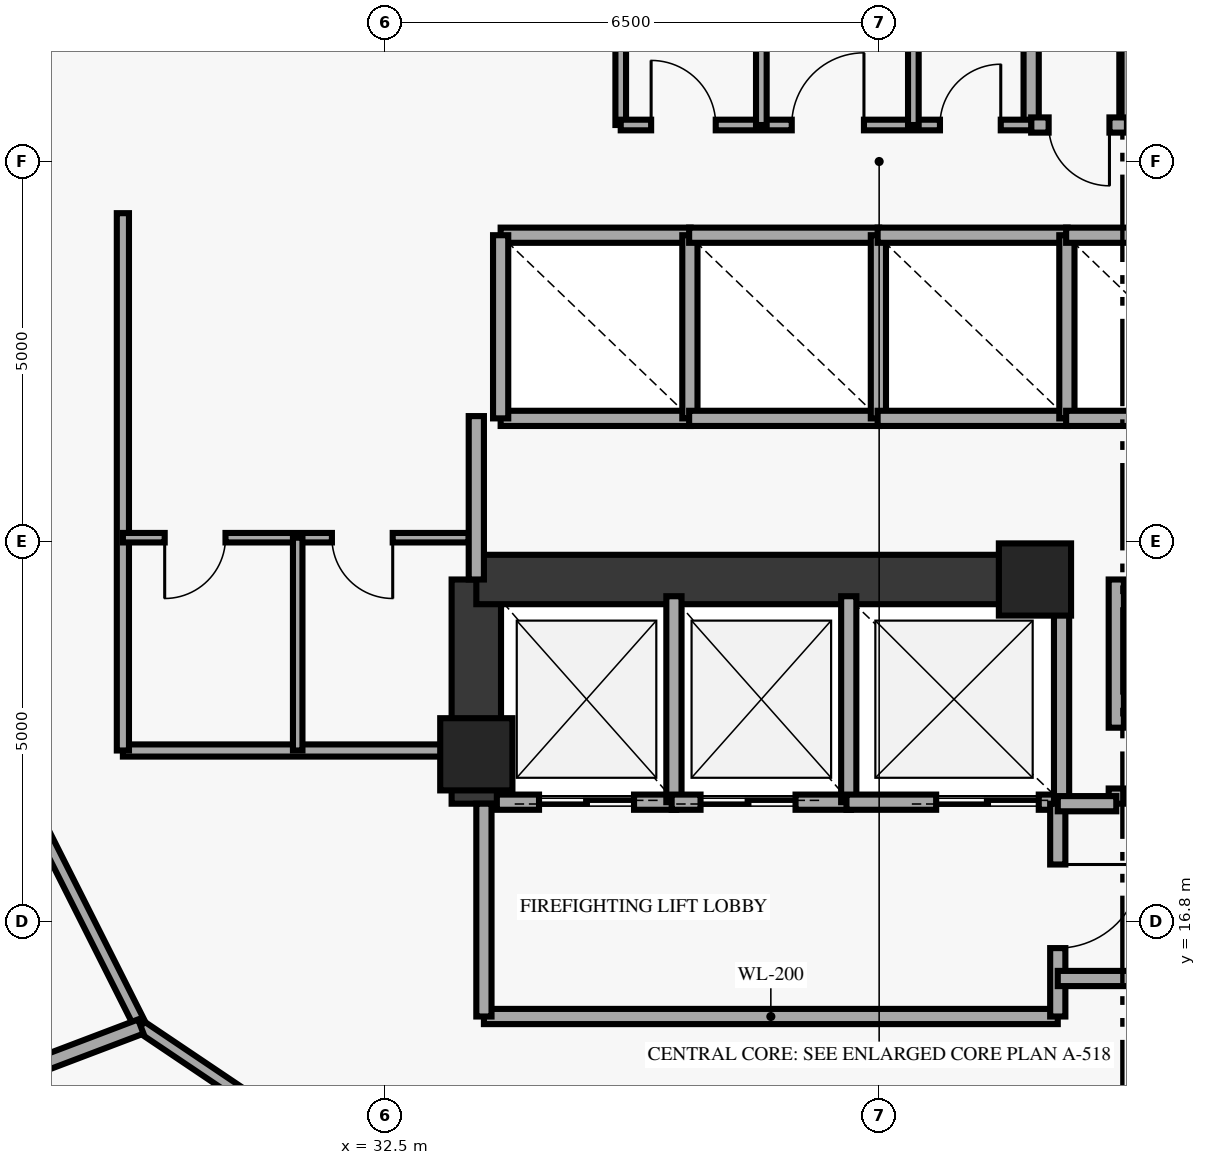
"""IFC4 building model, lengths in metres.
Left out: names, types, materials, properties, quantities, classifications, styles, units other than length and angle.
Written with IfcOpenShell. Run it as: python <this file> out.ifc"""

import sys

from ifc_helpers import new_model, si_unit, direction, frame, frame_2d, origin, origin_2d, place, context, subcontext, project, spatial, rectangle, extrude, element, fill, save


model = new_model("IFC4")
c1 = context("Model", 3, precision=1e-05, world=origin(), true_north=direction((0.0, 1.0)))
c2 = subcontext(c1, "Body", "Model", "MODEL_VIEW")
j1 = project(units=[si_unit("LENGTHUNIT", "METRE"), si_unit("PLANEANGLEUNIT", "RADIAN")], contexts=[c1])
p1 = place(None, origin())
s1 = spatial("IfcSite", under=j1, at=p1, CompositionType="ELEMENT")
p2 = place(p1, origin())
s2 = spatial("IfcBuilding", under=s1, at=p2, CompositionType="ELEMENT")
p3 = place(p2, frame((0.0, 0.0, 195.95)))
s3 = spatial("IfcBuildingStorey", under=s2, at=p3, CompositionType="ELEMENT", Elevation=195.95)
for number, where, z_axis, x_axis in (
    (1, (33.7, 19.0, 0.0), (0.0, 0.0, 1.0), (1.0, 0.0, 0.0)),
    (2, (41.05, 21.3, 0.0), (0.0, 0.0, 1.0), (1.0, 0.0, 0.0)),
):
    element("IfcColumn", number, at=place(p3, frame(where, z_axis=z_axis, x_axis=x_axis)), inside=s3, PredefinedType="PILASTER", context=c2, shape_type="SweptSolid", body=[
        extrude(rectangle(XDim=0.95, YDim=0.95, at=origin_2d()), origin(), (0.0, 0.0, 1.0), 6.88),
    ])
p4 = place(p3, frame((33.7, 18.35, 0.0), z_axis=(0.0, 0.0, 1.0), x_axis=(0.0, 1.0, 0.0)))
e3 = element("IfcWall", 3, at=p4, inside=s3, PredefinedType="SHEAR", context=c2, shape_type="SweptSolid", body=[
    extrude(rectangle(XDim=2.95, YDim=0.65, at=frame_2d((1.475, 0.0))), origin(), (0.0, 0.0, 1.0), 6.88),
])
p5 = place(p3, frame((33.7, 21.3, 0.0), z_axis=(0.0, 0.0, 1.0), x_axis=(1.0, 0.0, 0.0)))
e4 = element("IfcWall", 4, at=p5, inside=s3, PredefinedType="SHEAR", context=c2, shape_type="SweptSolid", body=[
    extrude(rectangle(XDim=7.55, YDim=0.65, at=frame_2d((3.775, 0.0))), origin(), (0.0, 0.0, 1.0), 6.88),
])
p6 = place(p3, frame((35.6, 27.28, 0.0), z_axis=(0.0, 0.0, 1.0), x_axis=(0.0, 1.0, 0.0)))
e5 = element("IfcWall", 5, at=p6, inside=s3, PredefinedType="PARTITIONING", context=c2, shape_type="SweptSolid", body=[
    extrude(rectangle(XDim=1.77, YDim=0.14, at=frame_2d((0.885, 0.0))), origin(), (0.0, 0.0, 1.0), 6.88),
])
for number, where, z_axis, x_axis in (
    (6, (41.0, 27.28, 0.0), (0.0, 0.0, 1.0), (0.0, 1.0, 0.0)),
    (7, (42.26, 27.28, 0.0), (0.0, 0.0, 1.0), (0.0, 1.0, 0.0)),
):
    element("IfcWall", number, at=place(p3, frame(where, z_axis=z_axis, x_axis=x_axis)), inside=s3, PredefinedType="SOLIDWALL", context=c2, shape_type="SweptSolid", body=[
        extrude(rectangle(XDim=1.77, YDim=0.2, at=frame_2d((0.885, 0.0))), origin(), (0.0, 0.0, 1.0), 6.88),
    ])
p7 = place(p3, frame((41.0, 27.28, 0.0), z_axis=(0.0, 0.0, 1.0), x_axis=(1.0, 0.0, 0.0)))
e8 = element("IfcWall", 8, at=p7, inside=s3, PredefinedType="SOLIDWALL", context=c2, shape_type="SweptSolid", body=[
    extrude(rectangle(XDim=1.26, YDim=0.2, at=frame_2d((0.63, 0.0))), origin(), (0.0, 0.0, 1.0), 6.88),
])
p8 = place(p7, frame((0.23, 0.0, 0.0)))
e9 = element("IfcOpeningElement", 9, at=p8, cuts=e8, PredefinedType="OPENING", context=c2, shape_type="SweptSolid", body=[
    extrude(rectangle(XDim=0.8, YDim=2.05, at=frame_2d((0.4, 1.025))), frame((0.0, 0.11, 0.0), z_axis=(0.0, -1.0, 0.0), x_axis=(1.0, 0.0, 0.0)), (0.0, 0.0, 1.0), 0.22),
])
for number, where, z_axis, x_axis in (
    (10, (34.02, 23.42, 0.0), (0.0, 0.0, 1.0), (1.0, 0.0, 0.0)),
    (11, (34.02, 25.83, 0.0), (0.0, 0.0, 1.0), (1.0, 0.0, 0.0)),
):
    element("IfcWall", number, at=place(p3, frame(where, z_axis=z_axis, x_axis=x_axis)), inside=s3, PredefinedType="SOLIDWALL", context=c2, shape_type="SweptSolid", body=[
        extrude(rectangle(XDim=2.5, YDim=0.2, at=frame_2d((1.25, 0.0))), origin(), (0.0, 0.0, 1.0), 6.88),
    ])
for number, where, z_axis, x_axis in (
    (12, (34.02, 23.42, 0.0), (0.0, 0.0, 1.0), (0.0, 1.0, 0.0)),
    (13, (36.51, 23.42, 0.0), (0.0, 0.0, 1.0), (0.0, 1.0, 0.0)),
):
    element("IfcWall", number, at=place(p3, frame(where, z_axis=z_axis, x_axis=x_axis)), inside=s3, PredefinedType="SOLIDWALL", context=c2, shape_type="SweptSolid", body=[
        extrude(rectangle(XDim=2.41, YDim=0.2, at=frame_2d((1.205, 0.0))), origin(), (0.0, 0.0, 1.0), 6.88),
    ])
for number, where, z_axis, x_axis in (
    (14, (36.5, 23.42, 0.0), (0.0, 0.0, 1.0), (1.0, 0.0, 0.0)),
    (15, (36.5, 25.83, 0.0), (0.0, 0.0, 1.0), (1.0, 0.0, 0.0)),
):
    element("IfcWall", number, at=place(p3, frame(where, z_axis=z_axis, x_axis=x_axis)), inside=s3, PredefinedType="SOLIDWALL", context=c2, shape_type="SweptSolid", body=[
        extrude(rectangle(XDim=2.5, YDim=0.2, at=frame_2d((1.25, 0.0))), origin(), (0.0, 0.0, 1.0), 6.88),
    ])
p9 = place(p3, frame((38.99, 23.42, 0.0), z_axis=(0.0, 0.0, 1.0), x_axis=(0.0, 1.0, 0.0)))
e16 = element("IfcWall", 16, at=p9, inside=s3, PredefinedType="SOLIDWALL", context=c2, shape_type="SweptSolid", body=[
    extrude(rectangle(XDim=2.41, YDim=0.2, at=frame_2d((1.205, 0.0))), origin(), (0.0, 0.0, 1.0), 6.88),
])
for number, where, z_axis, x_axis in (
    (17, (38.98, 23.42, 0.0), (0.0, 0.0, 1.0), (1.0, 0.0, 0.0)),
    (18, (38.98, 25.83, 0.0), (0.0, 0.0, 1.0), (1.0, 0.0, 0.0)),
):
    element("IfcWall", number, at=place(p3, frame(where, z_axis=z_axis, x_axis=x_axis)), inside=s3, PredefinedType="SOLIDWALL", context=c2, shape_type="SweptSolid", body=[
        extrude(rectangle(XDim=2.5, YDim=0.2, at=frame_2d((1.25, 0.0))), origin(), (0.0, 0.0, 1.0), 6.88),
    ])
p10 = place(p3, frame((41.47, 23.42, 0.0), z_axis=(0.0, 0.0, 1.0), x_axis=(0.0, 1.0, 0.0)))
e19 = element("IfcWall", 19, at=p10, inside=s3, PredefinedType="SOLIDWALL", context=c2, shape_type="SweptSolid", body=[
    extrude(rectangle(XDim=2.41, YDim=0.2, at=frame_2d((1.205, 0.0))), origin(), (0.0, 0.0, 1.0), 6.88),
])
for number, where, z_axis, x_axis in (
    (20, (41.46, 23.42, 0.0), (0.0, 0.0, 1.0), (1.0, 0.0, 0.0)),
    (21, (41.46, 25.83, 0.0), (0.0, 0.0, 1.0), (1.0, 0.0, 0.0)),
):
    element("IfcWall", number, at=place(p3, frame(where, z_axis=z_axis, x_axis=x_axis)), inside=s3, PredefinedType="SOLIDWALL", context=c2, shape_type="SweptSolid", body=[
        extrude(rectangle(XDim=2.5, YDim=0.2, at=frame_2d((1.25, 0.0))), origin(), (0.0, 0.0, 1.0), 6.88),
    ])
p11 = place(p3, frame((33.97, 18.37, 0.0), z_axis=(0.0, 0.0, 1.0), x_axis=(1.0, 0.0, 0.0)))
e22 = element("IfcWall", 22, at=p11, inside=s3, PredefinedType="SOLIDWALL", context=c2, shape_type="SweptSolid", body=[
    extrude(rectangle(XDim=2.36, YDim=0.2, at=frame_2d((1.18, 0.0))), origin(), (0.0, 0.0, 1.0), 6.88),
])
p12 = place(p11, frame((0.555, 0.0, 0.0)))
e23 = element("IfcOpeningElement", 23, at=p12, cuts=e22, PredefinedType="OPENING", context=c2, shape_type="SweptSolid", body=[
    extrude(rectangle(XDim=1.25, YDim=2.2, at=frame_2d((0.625, 1.1))), frame((0.0, 0.11, 0.0), z_axis=(0.0, -1.0, 0.0), x_axis=(1.0, 0.0, 0.0)), (0.0, 0.0, 1.0), 0.22),
])
p13 = place(p3, frame((36.3, 18.37, 0.0), z_axis=(0.0, 0.0, 1.0), x_axis=(0.0, 1.0, 0.0)))
e24 = element("IfcWall", 24, at=p13, inside=s3, PredefinedType="SOLIDWALL", context=c2, shape_type="SweptSolid", body=[
    extrude(rectangle(XDim=2.71, YDim=0.2, at=frame_2d((1.355, 0.0))), origin(), (0.0, 0.0, 1.0), 6.88),
])
p14 = place(p3, frame((36.27, 18.37, 0.0), z_axis=(0.0, 0.0, 1.0), x_axis=(1.0, 0.0, 0.0)))
e25 = element("IfcWall", 25, at=p14, inside=s3, PredefinedType="SOLIDWALL", context=c2, shape_type="SweptSolid", body=[
    extrude(rectangle(XDim=2.36, YDim=0.2, at=frame_2d((1.18, 0.0))), origin(), (0.0, 0.0, 1.0), 6.88),
])
p15 = place(p14, frame((0.38, 0.0, 0.0)))
e26 = element("IfcOpeningElement", 26, at=p15, cuts=e25, PredefinedType="OPENING", context=c2, shape_type="SweptSolid", body=[
    extrude(rectangle(XDim=1.25, YDim=2.2, at=frame_2d((0.625, 1.1))), frame((0.0, 0.11, 0.0), z_axis=(0.0, -1.0, 0.0), x_axis=(1.0, 0.0, 0.0)), (0.0, 0.0, 1.0), 0.22),
])
p16 = place(p3, frame((38.6, 18.37, 0.0), z_axis=(0.0, 0.0, 1.0), x_axis=(0.0, 1.0, 0.0)))
e27 = element("IfcWall", 27, at=p16, inside=s3, PredefinedType="SOLIDWALL", context=c2, shape_type="SweptSolid", body=[
    extrude(rectangle(XDim=2.71, YDim=0.2, at=frame_2d((1.355, 0.0))), origin(), (0.0, 0.0, 1.0), 6.88),
])
p17 = place(p3, frame((38.57, 18.37, 0.0), z_axis=(0.0, 0.0, 1.0), x_axis=(1.0, 0.0, 0.0)))
e28 = element("IfcWall", 28, at=p17, inside=s3, PredefinedType="SOLIDWALL", context=c2, shape_type="SweptSolid", body=[
    extrude(rectangle(XDim=2.83, YDim=0.2, at=frame_2d((1.415, 0.0))), origin(), (0.0, 0.0, 1.0), 6.88),
])
p18 = place(p17, frame((1.18, 0.0, 0.0)))
e29 = element("IfcOpeningElement", 29, at=p18, cuts=e28, PredefinedType="OPENING", context=c2, shape_type="SweptSolid", body=[
    extrude(rectangle(XDim=1.35, YDim=2.18, at=frame_2d((0.675, 1.09))), frame((0.0, 0.11, 0.0), z_axis=(0.0, -1.0, 0.0), x_axis=(1.0, 0.0, 0.0)), (0.0, 0.0, 1.0), 0.22),
])
p19 = place(p3, frame((41.4, 18.37, 0.0), z_axis=(0.0, 0.0, 1.0), x_axis=(0.0, 1.0, 0.0)))
e30 = element("IfcWall", 30, at=p19, inside=s3, PredefinedType="SOLIDWALL", context=c2, shape_type="SweptSolid", body=[
    extrude(rectangle(XDim=2.71, YDim=0.2, at=frame_2d((1.355, 0.0))), origin(), (0.0, 0.0, 1.0), 6.88),
])
p20 = place(p3, frame((29.05, 19.05, 0.0), z_axis=(0.0, 0.0, 1.0), x_axis=(1.0, 0.0, 0.0)))
e31 = element("IfcWall", 31, at=p20, inside=s3, PredefinedType="PARTITIONING", context=c2, shape_type="SweptSolid", body=[
    extrude(rectangle(XDim=4.65, YDim=0.16, at=frame_2d((2.325, 0.0))), origin(), (0.0, 0.0, 1.0), 6.88),
])
p21 = place(p3, frame((29.05, 19.05, 0.0), z_axis=(0.0, 0.0, 1.0), x_axis=(0.0, 1.0, 0.0)))
e32 = element("IfcWall", 32, at=p21, inside=s3, PredefinedType="PARTITIONING", context=c2, shape_type="SweptSolid", body=[
    extrude(rectangle(XDim=7.07, YDim=0.16, at=frame_2d((3.535, 0.0))), origin(), (0.0, 0.0, 1.0), 6.88),
])
p22 = place(p3, frame((33.6, 21.85, 0.0), z_axis=(0.0, 0.0, 1.0), x_axis=(-1.0, 0.0, 0.0)))
e33 = element("IfcWall", 33, at=p22, inside=s3, PredefinedType="PARTITIONING", context=c2, shape_type="SweptSolid", body=[
    extrude(rectangle(XDim=4.55, YDim=0.125, at=frame_2d((2.275, 0.0))), origin(), (0.0, 0.0, 1.0), 6.88),
])
p23 = place(p22, frame((3.2, 0.0, 0.0)))
e34 = element("IfcOpeningElement", 34, at=p23, cuts=e33, PredefinedType="OPENING", context=c2, shape_type="SweptSolid", body=[
    extrude(rectangle(XDim=0.8, YDim=2.05, at=frame_2d((0.4, 1.025))), frame((0.0, 0.073, 0.0), z_axis=(0.0, -1.0, 0.0), x_axis=(1.0, 0.0, 0.0)), (0.0, 0.0, 1.0), 0.145),
])
p24 = place(p22, frame((1.0, 0.0, 0.0)))
e35 = element("IfcOpeningElement", 35, at=p24, cuts=e33, PredefinedType="OPENING", context=c2, shape_type="SweptSolid", body=[
    extrude(rectangle(XDim=0.8, YDim=2.05, at=frame_2d((0.4, 1.025))), frame((0.0, 0.073, 0.0), z_axis=(0.0, -1.0, 0.0), x_axis=(1.0, 0.0, 0.0)), (0.0, 0.0, 1.0), 0.145),
])
p25 = place(p3, frame((31.35, 19.05, 0.0), z_axis=(0.0, 0.0, 1.0), x_axis=(0.0, 1.0, 0.0)))
e36 = element("IfcWall", 36, at=p25, inside=s3, PredefinedType="PARTITIONING", context=c2, shape_type="SweptSolid", body=[
    extrude(rectangle(XDim=2.8, YDim=0.125, at=frame_2d((1.4, 0.0))), origin(), (0.0, 0.0, 1.0), 6.88),
])
p26 = place(p3, frame((33.7, 21.3, 0.0), z_axis=(0.0, 0.0, 1.0), x_axis=(0.0, 1.0, 0.0)))
e37 = element("IfcWall", 37, at=p26, inside=s3, PredefinedType="SOLIDWALL", context=c2, shape_type="SweptSolid", body=[
    extrude(rectangle(XDim=2.15, YDim=0.2, at=frame_2d((1.075, 0.0))), origin(), (0.0, 0.0, 1.0), 6.265),
])
p27 = place(p3, frame((33.8, 15.55, 0.0), z_axis=(0.0, 0.0, 1.0), x_axis=(1.0, 0.0, 0.0)))
e38 = element("IfcWall", 38, at=p27, inside=s3, PredefinedType="SOLIDWALL", context=c2, shape_type="SweptSolid", body=[
    extrude(rectangle(XDim=7.55, YDim=0.2, at=frame_2d((3.775, 0.0))), origin(), (0.0, 0.0, 1.0), 6.88),
])
p28 = place(p3, frame((33.8, 15.55, 0.0), z_axis=(0.0, 0.0, 1.0), x_axis=(0.0, 1.0, 0.0)))
e39 = element("IfcWall", 39, at=p28, inside=s3, PredefinedType="SOLIDWALL", context=c2, shape_type="SweptSolid", body=[
    extrude(rectangle(XDim=2.8, YDim=0.2, at=frame_2d((1.4, 0.0))), origin(), (0.0, 0.0, 1.0), 6.88),
])
p29 = place(p3, frame((41.35, 15.55, 0.0), z_axis=(0.0, 0.0, 1.0), x_axis=(0.0, 1.0, 0.0)))
e40 = element("IfcWall", 40, at=p29, inside=s3, PredefinedType="SOLIDWALL", context=c2, shape_type="SweptSolid", body=[
    extrude(rectangle(XDim=2.8, YDim=0.2, at=frame_2d((1.4, 0.0))), origin(), (0.0, 0.0, 1.0), 6.88),
])
p30 = place(p29, frame((0.9, 0.0, 0.0)))
e41 = element("IfcOpeningElement", 41, at=p30, cuts=e40, PredefinedType="OPENING", context=c2, shape_type="SweptSolid", body=[
    extrude(rectangle(XDim=1.1, YDim=2.15, at=frame_2d((0.55, 1.075))), frame((0.0, 0.11, 0.0), z_axis=(0.0, -1.0, 0.0), x_axis=(1.0, 0.0, 0.0)), (0.0, 0.0, 1.0), 0.22),
])
p31 = place(p3, frame((41.35, 16.05, 0.0), z_axis=(0.0, 0.0, 1.0), x_axis=(1.0, 0.0, 0.0)))
e42 = element("IfcWall", 42, at=p31, inside=s3, PredefinedType="SOLIDWALL", context=c2, shape_type="SweptSolid", body=[
    extrude(rectangle(XDim=4.5, YDim=0.2, at=frame_2d((2.25, 0.0))), origin(), (0.0, 0.0, 1.0), 6.88),
])
p32 = place(p3, frame((42.12, 18.35, 0.0), z_axis=(0.0, 0.0, 1.0), x_axis=(0.0, 1.0, 0.0)))
e43 = element("IfcWall", 43, at=p32, inside=s3, PredefinedType="SOLIDWALL", context=c2, shape_type="SweptSolid", body=[
    extrude(rectangle(XDim=2.95, YDim=0.2, at=frame_2d((1.475, 0.0))), origin(), (0.0, 0.0, 1.0), 6.88),
])
p33 = place(p32, frame((0.2, 0.0, 0.0)))
e44 = element("IfcOpeningElement", 44, at=p33, cuts=e43, PredefinedType="OPENING", context=c2, shape_type="SweptSolid", body=[
    extrude(rectangle(XDim=0.8, YDim=2.05, at=frame_2d((0.4, 1.025))), frame((0.0, 0.11, 0.0), z_axis=(0.0, -1.0, 0.0), x_axis=(1.0, 0.0, 0.0)), (0.0, 0.0, 1.0), 0.22),
])
p34 = place(p3, frame((41.35, 18.35, 0.0), z_axis=(0.0, 0.0, 1.0), x_axis=(1.0, 0.0, 0.0)))
e45 = element("IfcWall", 45, at=p34, inside=s3, PredefinedType="SOLIDWALL", context=c2, shape_type="SweptSolid", body=[
    extrude(rectangle(XDim=0.77, YDim=0.2, at=frame_2d((0.385, 0.0))), origin(), (0.0, 0.0, 1.0), 6.88),
])
p35 = place(p3, frame((35.6, 27.28, 0.0), z_axis=(0.0, 0.0, 1.0), x_axis=(1.0, 0.0, 0.0)))
e46 = element("IfcWall", 46, at=p35, inside=s3, PredefinedType="PARTITIONING", context=c2, shape_type="SweptSolid", body=[
    extrude(rectangle(XDim=5.4, YDim=0.14, at=frame_2d((2.7, 0.0))), origin(), (0.0, 0.0, 1.0), 6.88),
])
p36 = place(p35, frame((0.4, 0.0, 0.0)))
e47 = element("IfcOpeningElement", 47, at=p36, cuts=e46, PredefinedType="OPENING", context=c2, shape_type="SweptSolid", body=[
    extrude(rectangle(XDim=0.85, YDim=2.1, at=frame_2d((0.425, 1.05))), frame((0.0, 0.08, 0.0), z_axis=(0.0, -1.0, 0.0), x_axis=(1.0, 0.0, 0.0)), (0.0, 0.0, 1.0), 0.16),
])
p37 = place(p35, frame((2.25, 0.0, 0.0)))
e48 = element("IfcOpeningElement", 48, at=p37, cuts=e46, PredefinedType="OPENING", context=c2, shape_type="SweptSolid", body=[
    extrude(rectangle(XDim=0.95, YDim=2.1, at=frame_2d((0.475, 1.05))), frame((0.0, 0.08, 0.0), z_axis=(0.0, -1.0, 0.0), x_axis=(1.0, 0.0, 0.0)), (0.0, 0.0, 1.0), 0.16),
])
p38 = place(p35, frame((4.2, 0.0, 0.0)))
e49 = element("IfcOpeningElement", 49, at=p38, cuts=e46, PredefinedType="OPENING", context=c2, shape_type="SweptSolid", body=[
    extrude(rectangle(XDim=0.8, YDim=2.05, at=frame_2d((0.4, 1.025))), frame((0.0, 0.08, 0.0), z_axis=(0.0, -1.0, 0.0), x_axis=(1.0, 0.0, 0.0)), (0.0, 0.0, 1.0), 0.16),
])
for number, where, z_axis, x_axis in (
    (50, (37.45, 27.28, 0.0), (0.0, 0.0, 1.0), (0.0, 1.0, 0.0)),
    (51, (39.45, 27.28, 0.0), (0.0, 0.0, 1.0), (0.0, 1.0, 0.0)),
):
    element("IfcWall", number, at=place(p3, frame(where, z_axis=z_axis, x_axis=x_axis)), inside=s3, PredefinedType="PARTITIONING", context=c2, shape_type="SweptSolid", body=[
        extrude(rectangle(XDim=1.77, YDim=0.14, at=frame_2d((0.885, 0.0))), origin(), (0.0, 0.0, 1.0), 6.88),
    ])
p39 = place(p3, frame((25.663, 22.614, 0.0), z_axis=(0.0, 0.0, 1.0), x_axis=(0.449672541353, -0.893193487187, 0.0)))
e52 = element("IfcWall", 52, at=p39, inside=s3, PredefinedType="PARTITIONING", context=c2, shape_type="SweptSolid", body=[
    extrude(rectangle(XDim=8.057, YDim=0.16, at=frame_2d((4.028, 0.0))), origin(), (0.0, 0.0, 1.0), 6.88),
])
p40 = place(p3, frame((29.286, 15.418, 0.0), z_axis=(0.0, 0.0, 1.0), x_axis=(0.829606474383, -0.558348544962, 0.0)))
e53 = element("IfcWall", 53, at=p40, inside=s3, PredefinedType="PARTITIONING", context=c2, shape_type="SweptSolid", body=[
    extrude(rectangle(XDim=3.716, YDim=0.16, at=frame_2d((1.858, 0.0))), origin(), (0.0, 0.0, 1.0), 6.88),
])
p41 = place(p3, frame((29.286, 15.418, 0.0), z_axis=(0.0, 0.0, 1.0), x_axis=(-0.934893013083, -0.354929646674, 0.0)))
e54 = element("IfcWall", 54, at=p41, inside=s3, PredefinedType="SOLIDWALL", context=c2, shape_type="SweptSolid", body=[
    extrude(rectangle(XDim=7.509, YDim=0.2, at=frame_2d((3.754, 0.0))), origin(), (0.0, 0.0, 1.0), 6.88),
])
p42 = place(p8, origin())
e55 = element("IfcDoor", 55, at=p42, inside=s3, OperationType="SINGLE_SWING_RIGHT", PredefinedType="DOOR", context=c2, shape_type="SweptSolid", body=[
    extrude(rectangle(XDim=0.8, YDim=2.05, at=frame_2d((0.4, 1.025))), frame((0.0, 0.025, 0.0), z_axis=(0.0, -1.0, 0.0), x_axis=(1.0, 0.0, 0.0)), (0.0, 0.0, 1.0), 0.05),
])
fill(e9, e55)
p43 = place(p12, origin())
e56 = element("IfcDoor", 56, at=p43, inside=s3, OperationType="DOUBLE_DOOR_SLIDING", PredefinedType="DOOR", context=c2, shape_type="SweptSolid", body=[
    extrude(rectangle(XDim=1.25, YDim=2.2, at=frame_2d((0.625, 1.1))), frame((0.0, 0.025, 0.0), z_axis=(0.0, -1.0, 0.0), x_axis=(1.0, 0.0, 0.0)), (0.0, 0.0, 1.0), 0.05),
])
fill(e23, e56)
p44 = place(p15, origin())
e57 = element("IfcDoor", 57, at=p44, inside=s3, OperationType="DOUBLE_DOOR_SLIDING", PredefinedType="DOOR", context=c2, shape_type="SweptSolid", body=[
    extrude(rectangle(XDim=1.25, YDim=2.2, at=frame_2d((0.625, 1.1))), frame((0.0, 0.025, 0.0), z_axis=(0.0, -1.0, 0.0), x_axis=(1.0, 0.0, 0.0)), (0.0, 0.0, 1.0), 0.05),
])
fill(e26, e57)
p45 = place(p18, origin())
e58 = element("IfcDoor", 58, at=p45, inside=s3, OperationType="DOUBLE_DOOR_SLIDING", PredefinedType="DOOR", context=c2, shape_type="SweptSolid", body=[
    extrude(rectangle(XDim=1.35, YDim=2.18, at=frame_2d((0.675, 1.09))), frame((0.0, 0.025, 0.0), z_axis=(0.0, -1.0, 0.0), x_axis=(1.0, 0.0, 0.0)), (0.0, 0.0, 1.0), 0.05),
])
fill(e29, e58)
p46 = place(p23, origin())
e59 = element("IfcDoor", 59, at=p46, inside=s3, OperationType="SINGLE_SWING_RIGHT", PredefinedType="DOOR", context=c2, shape_type="SweptSolid", body=[
    extrude(rectangle(XDim=0.8, YDim=2.05, at=frame_2d((0.4, 1.025))), frame((0.0, 0.025, 0.0), z_axis=(0.0, -1.0, 0.0), x_axis=(1.0, 0.0, 0.0)), (0.0, 0.0, 1.0), 0.05),
])
fill(e34, e59)
p47 = place(p24, origin())
e60 = element("IfcDoor", 60, at=p47, inside=s3, OperationType="SINGLE_SWING_LEFT", PredefinedType="DOOR", context=c2, shape_type="SweptSolid", body=[
    extrude(rectangle(XDim=0.8, YDim=2.05, at=frame_2d((0.4, 1.025))), frame((0.0, 0.025, 0.0), z_axis=(0.0, -1.0, 0.0), x_axis=(1.0, 0.0, 0.0)), (0.0, 0.0, 1.0), 0.05),
])
fill(e35, e60)
p48 = place(p30, origin())
e61 = element("IfcDoor", 61, at=p48, inside=s3, OperationType="SINGLE_SWING_RIGHT", PredefinedType="DOOR", context=c2, shape_type="SweptSolid", body=[
    extrude(rectangle(XDim=1.1, YDim=2.15, at=frame_2d((0.55, 1.075))), frame((0.0, 0.025, 0.0), z_axis=(0.0, -1.0, 0.0), x_axis=(1.0, 0.0, 0.0)), (0.0, 0.0, 1.0), 0.05),
])
fill(e41, e61)
p49 = place(p33, origin())
e62 = element("IfcDoor", 62, at=p49, inside=s3, OperationType="SINGLE_SWING_LEFT", PredefinedType="DOOR", context=c2, shape_type="SweptSolid", body=[
    extrude(rectangle(XDim=0.8, YDim=2.05, at=frame_2d((0.4, 1.025))), frame((0.0, 0.025, 0.0), z_axis=(0.0, -1.0, 0.0), x_axis=(1.0, 0.0, 0.0)), (0.0, 0.0, 1.0), 0.05),
])
fill(e44, e62)
p50 = place(p36, origin())
e63 = element("IfcDoor", 63, at=p50, inside=s3, OperationType="SINGLE_SWING_LEFT", PredefinedType="DOOR", context=c2, shape_type="SweptSolid", body=[
    extrude(rectangle(XDim=0.85, YDim=2.1, at=frame_2d((0.425, 1.05))), frame((0.0, 0.025, 0.0), z_axis=(0.0, -1.0, 0.0), x_axis=(1.0, 0.0, 0.0)), (0.0, 0.0, 1.0), 0.05),
])
fill(e47, e63)
p51 = place(p37, origin())
e64 = element("IfcDoor", 64, at=p51, inside=s3, OperationType="SINGLE_SWING_RIGHT", PredefinedType="DOOR", context=c2, shape_type="SweptSolid", body=[
    extrude(rectangle(XDim=0.95, YDim=2.1, at=frame_2d((0.475, 1.05))), frame((0.0, 0.025, 0.0), z_axis=(0.0, -1.0, 0.0), x_axis=(1.0, 0.0, 0.0)), (0.0, 0.0, 1.0), 0.05),
])
fill(e48, e64)
p52 = place(p38, origin())
e65 = element("IfcDoor", 65, at=p52, inside=s3, OperationType="SINGLE_SWING_RIGHT", PredefinedType="DOOR", context=c2, shape_type="SweptSolid", body=[
    extrude(rectangle(XDim=0.8, YDim=2.05, at=frame_2d((0.4, 1.025))), frame((0.0, 0.025, 0.0), z_axis=(0.0, -1.0, 0.0), x_axis=(1.0, 0.0, 0.0)), (0.0, 0.0, 1.0), 0.05),
])
fill(e49, e65)
save(model, sys.argv[1])
